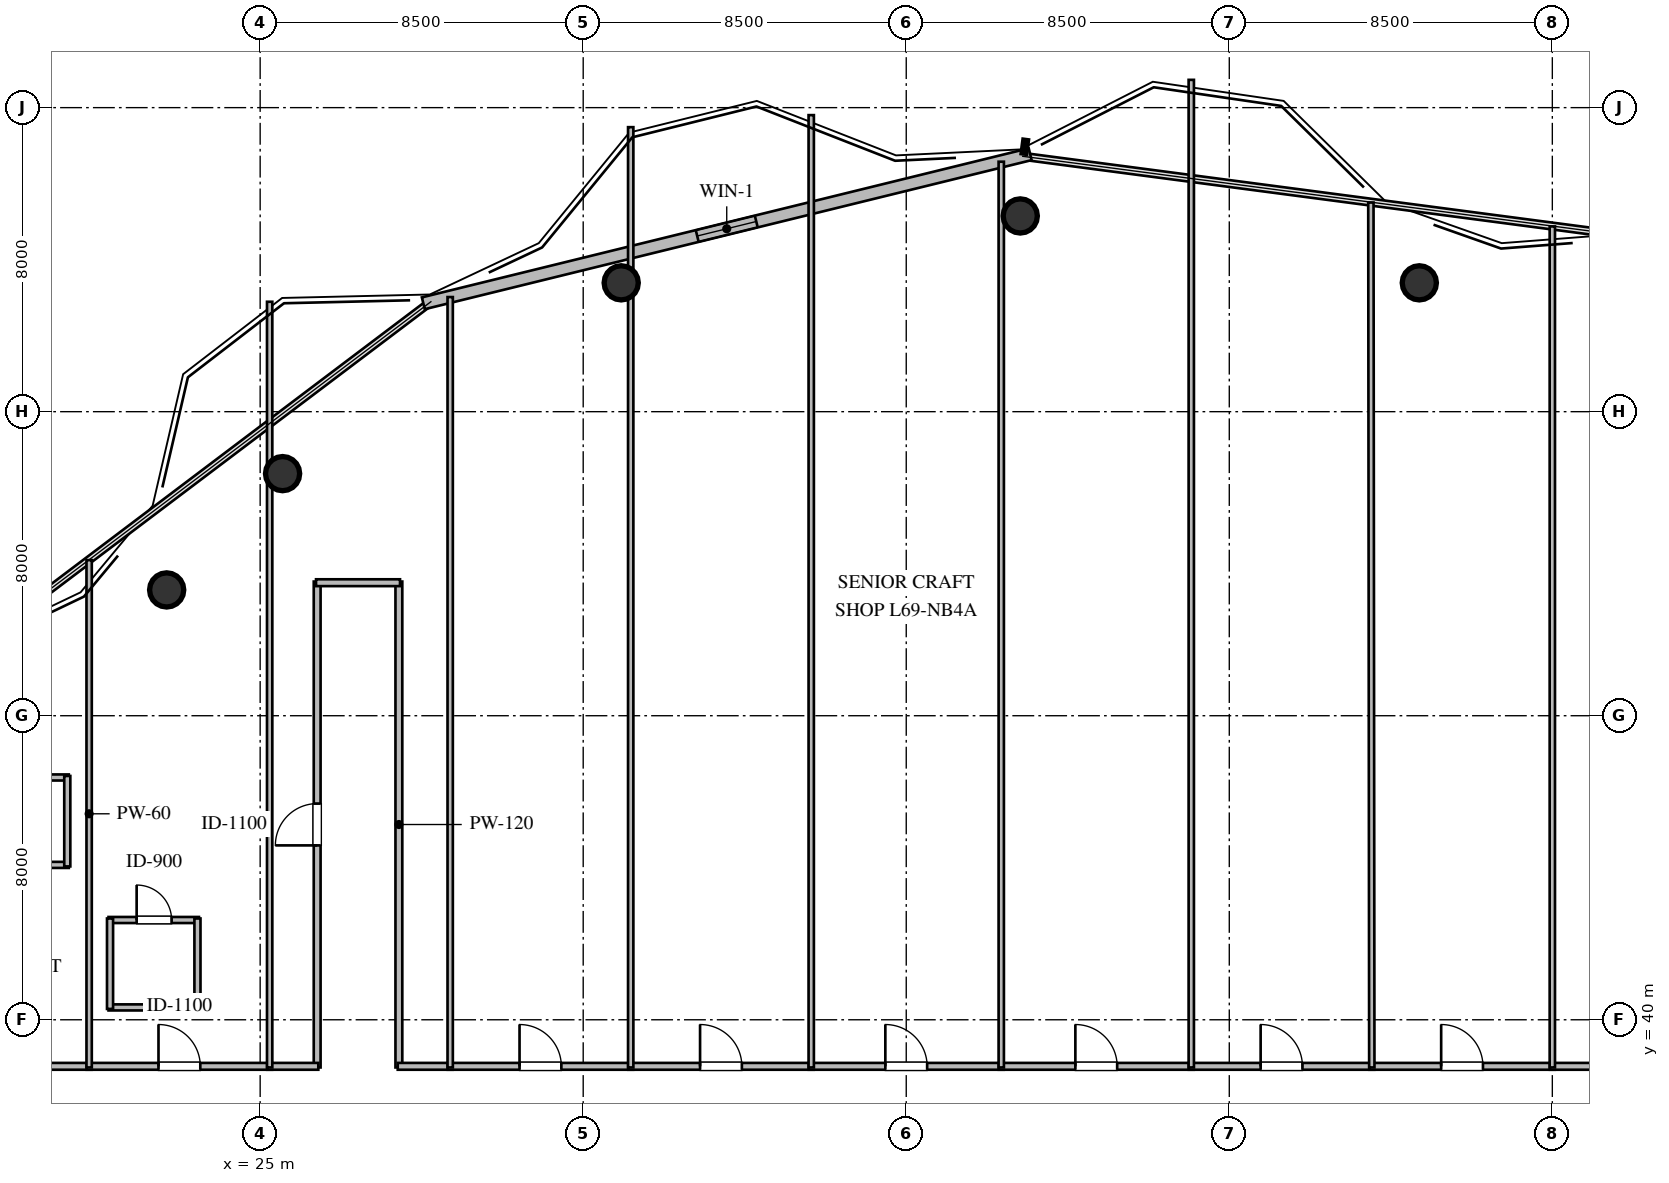
"""IFC4 building model, lengths in metres.
Left out: names, types, materials, properties, quantities, classifications, styles, units other than length and angle.
Written with IfcOpenShell. Run it as: python <this file> out.ifc"""

import sys

from ifc_helpers import new_model, si_unit, direction, frame, frame_2d, origin, origin_2d, place, context, subcontext, project, spatial, rectangle, circle, extrude, element, fill, save


model = new_model("IFC4")
c1 = context("Model", 3, precision=1e-05, world=origin(), true_north=direction((0.0, 1.0)))
c2 = subcontext(c1, "Body", "Model", "MODEL_VIEW")
j1 = project(units=[si_unit("LENGTHUNIT", "METRE"), si_unit("PLANEANGLEUNIT", "RADIAN")], contexts=[c1])
p1 = place(None, origin())
s1 = spatial("IfcSite", under=j1, at=p1, CompositionType="ELEMENT")
p2 = place(p1, origin())
s2 = spatial("IfcBuilding", under=s1, at=p2, CompositionType="ELEMENT")
p3 = place(p2, frame((0.0, 0.0, 262.4)))
s3 = spatial("IfcBuildingStorey", under=s2, at=p3, CompositionType="ELEMENT", Elevation=262.4)
for number, where, z_axis, x_axis in (
    (1, (55.5, 59.39, 0.0), (0.0, 0.0, 1.0), (1.0, 0.0, 0.0)),
    (2, (45.0, 61.15, 0.0), (0.0, 0.0, 1.0), (1.0, 0.0, 0.0)),
    (3, (34.5, 59.39, 0.0), (0.0, 0.0, 1.0), (1.0, 0.0, 0.0)),
    (4, (25.59, 54.37, 0.0), (0.0, 0.0, 1.0), (1.0, 0.0, 0.0)),
    (5, (22.54, 51.31, 0.0), (0.0, 0.0, 1.0), (1.0, 0.0, 0.0)),
):
    element("IfcColumn", number, at=place(p3, frame(where, z_axis=z_axis, x_axis=x_axis)), inside=s3, PredefinedType="COLUMN", context=c2, shape_type="SweptSolid", body=[
        extrude(circle(Radius=0.45, at=origin_2d()), origin(), (0.0, 0.0, 1.0), 3.8),
    ])
p4 = place(p3, frame((29.293, 58.852, 0.0), z_axis=(0.0, 0.0, 1.0), x_axis=(0.971137749742, 0.238519330508, 0.0)))
e6 = element("IfcWall", 6, at=p4, inside=s3, PredefinedType="STANDARD", context=c2, shape_type="SweptSolid", body=[
    extrude(rectangle(XDim=16.443, YDim=0.32, at=frame_2d((8.221, 0.0))), origin(), (0.0, 0.0, 1.0), 3.56),
])
p5 = place(p4, frame((7.421, 0.0, 1.05)))
e7 = element("IfcOpeningElement", 7, at=p5, cuts=e6, PredefinedType="OPENING", context=c2, shape_type="SweptSolid", body=[
    extrude(rectangle(XDim=1.6, YDim=1.5, at=frame_2d((0.8, 0.75))), frame((0.0, 0.17, 0.0), z_axis=(0.0, -1.0, 0.0), x_axis=(1.0, 0.0, 0.0)), (0.0, 0.0, 1.0), 0.34),
])
for number, where, z_axis, x_axis in (
    (8, (17.585, 44.075, 0.0), (0.0, 0.0, 1.0), (1.0, 0.0, 0.0)),
    (9, (17.585, 46.375, 0.0), (0.0, 0.0, 1.0), (1.0, 0.0, 0.0)),
    (10, (19.925, 44.035, 0.0), (0.0, 0.0, 1.0), (0.0, 1.0, 0.0)),
):
    element("IfcWall", number, at=place(p3, frame(where, z_axis=z_axis, x_axis=x_axis)), inside=s3, PredefinedType="PLUMBINGWALL", context=c2, shape_type="SweptSolid", body=[
        extrude(rectangle(XDim=2.38, YDim=0.16, at=frame_2d((1.19, 0.0))), origin(), (0.0, 0.0, 1.0), 3.56),
    ])
p6 = place(p3, frame((21.01, 40.325, 0.0), z_axis=(0.0, 0.0, 1.0), x_axis=(1.0, 0.0, 0.0)))
e11 = element("IfcWall", 11, at=p6, inside=s3, PredefinedType="PLUMBINGWALL", context=c2, shape_type="SweptSolid", body=[
    extrude(rectangle(XDim=2.38, YDim=0.16, at=frame_2d((1.19, 0.0))), origin(), (0.0, 0.0, 1.0), 3.56),
])
p7 = place(p3, frame((21.01, 42.625, 0.0), z_axis=(0.0, 0.0, 1.0), x_axis=(1.0, 0.0, 0.0)))
e12 = element("IfcWall", 12, at=p7, inside=s3, PredefinedType="PLUMBINGWALL", context=c2, shape_type="SweptSolid", body=[
    extrude(rectangle(XDim=2.38, YDim=0.16, at=frame_2d((1.19, 0.0))), origin(), (0.0, 0.0, 1.0), 3.56),
])
p8 = place(p7, frame((0.74, 0.0, 0.0)))
e13 = element("IfcOpeningElement", 13, at=p8, cuts=e12, PredefinedType="OPENING", context=c2, shape_type="SweptSolid", body=[
    extrude(rectangle(XDim=0.92, YDim=2.1, at=frame_2d((0.46, 1.05))), frame((0.0, 0.09, 0.0), z_axis=(0.0, -1.0, 0.0), x_axis=(1.0, 0.0, 0.0)), (0.0, 0.0, 1.0), 0.18),
])
p9 = place(p3, frame((21.05, 40.285, 0.0), z_axis=(0.0, 0.0, 1.0), x_axis=(0.0, 1.0, 0.0)))
e14 = element("IfcWall", 14, at=p9, inside=s3, PredefinedType="PLUMBINGWALL", context=c2, shape_type="SweptSolid", body=[
    extrude(rectangle(XDim=2.38, YDim=0.16, at=frame_2d((1.19, 0.0))), origin(), (0.0, 0.0, 1.0), 3.56),
])
p10 = place(p3, frame((23.35, 40.285, 0.0), z_axis=(0.0, 0.0, 1.0), x_axis=(0.0, 1.0, 0.0)))
e15 = element("IfcWall", 15, at=p10, inside=s3, PredefinedType="PLUMBINGWALL", context=c2, shape_type="SweptSolid", body=[
    extrude(rectangle(XDim=2.38, YDim=0.16, at=frame_2d((1.19, 0.0))), origin(), (0.0, 0.0, 1.0), 3.09),
])
p11 = place(p3, frame((15.651, 38.775, 0.0), z_axis=(0.0, 0.0, 1.0), x_axis=(1.0, 0.0, 0.0)))
e16 = element("IfcWall", 16, at=p11, inside=s3, PredefinedType="PARTITIONING", context=c2, shape_type="SweptSolid", body=[
    extrude(rectangle(XDim=4.914, YDim=0.18, at=frame_2d((2.457, 0.0))), origin(), (0.0, 0.0, 1.0), 3.56),
])
p12 = place(p11, frame((1.907, 0.0, 0.0)))
e17 = element("IfcOpeningElement", 17, at=p12, cuts=e16, PredefinedType="OPENING", context=c2, shape_type="SweptSolid", body=[
    extrude(rectangle(XDim=1.1, YDim=2.1, at=frame_2d((0.55, 1.05))), frame((0.0, 0.1, 0.0), z_axis=(0.0, -1.0, 0.0), x_axis=(1.0, 0.0, 0.0)), (0.0, 0.0, 1.0), 0.2),
])
p13 = place(p3, frame((20.435, 38.775, 0.0), z_axis=(0.0, 0.0, 1.0), x_axis=(1.0, 0.0, 0.0)))
e18 = element("IfcWall", 18, at=p13, inside=s3, PredefinedType="PARTITIONING", context=c2, shape_type="SweptSolid", body=[
    extrude(rectangle(XDim=4.88, YDim=0.18, at=frame_2d((2.44, 0.0))), origin(), (0.0, 0.0, 1.0), 3.56),
])
p14 = place(p13, frame((1.89, 0.0, 0.0)))
e19 = element("IfcOpeningElement", 19, at=p14, cuts=e18, PredefinedType="OPENING", context=c2, shape_type="SweptSolid", body=[
    extrude(rectangle(XDim=1.1, YDim=2.1, at=frame_2d((0.55, 1.05))), frame((0.0, 0.1, 0.0), z_axis=(0.0, -1.0, 0.0), x_axis=(1.0, 0.0, 0.0)), (0.0, 0.0, 1.0), 0.2),
])
p15 = place(p3, frame((26.5, 38.745, 0.0), z_axis=(0.0, 0.0, 1.0), x_axis=(0.0, 1.0, 0.0)))
e20 = element("IfcWall", 20, at=p15, inside=s3, PredefinedType="PARTITIONING", context=c2, shape_type="SweptSolid", body=[
    extrude(rectangle(XDim=12.785, YDim=0.18, at=frame_2d((6.393, 0.0))), origin(), (0.0, 0.0, 1.0), 3.56),
])
p16 = place(p15, frame((5.843, 0.0, 0.0)))
e21 = element("IfcOpeningElement", 21, at=p16, cuts=e20, PredefinedType="OPENING", context=c2, shape_type="SweptSolid", body=[
    extrude(rectangle(XDim=1.1, YDim=2.1, at=frame_2d((0.55, 1.05))), frame((0.0, 0.1, 0.0), z_axis=(0.0, -1.0, 0.0), x_axis=(1.0, 0.0, 0.0)), (0.0, 0.0, 1.0), 0.2),
])
p17 = place(p3, frame((28.65, 51.53, 0.0), z_axis=(0.0, 0.0, 1.0), x_axis=(0.0, -1.0, 0.0)))
e22 = element("IfcWall", 22, at=p17, inside=s3, PredefinedType="PARTITIONING", context=c2, shape_type="SweptSolid", body=[
    extrude(rectangle(XDim=12.785, YDim=0.18, at=frame_2d((6.393, 0.0))), origin(), (0.0, 0.0, 1.0), 3.56),
])
p18 = place(p3, frame((26.47, 51.5, 0.0), z_axis=(0.0, 0.0, 1.0), x_axis=(1.0, 0.0, 0.0)))
e23 = element("IfcWall", 23, at=p18, inside=s3, PredefinedType="PARTITIONING", context=c2, shape_type="SweptSolid", body=[
    extrude(rectangle(XDim=2.21, YDim=0.18, at=frame_2d((1.105, 0.0))), origin(), (0.0, 0.0, 1.0), 3.56),
])
p19 = place(p3, frame((28.62, 38.775, 0.0), z_axis=(0.0, 0.0, 1.0), x_axis=(1.0, 0.0, 0.0)))
e24 = element("IfcWall", 24, at=p19, inside=s3, PredefinedType="PARTITIONING", context=c2, shape_type="SweptSolid", body=[
    extrude(rectangle(XDim=1.445, YDim=0.18, at=frame_2d((0.722, 0.0))), origin(), (0.0, 0.0, 1.0), 3.56),
])
p20 = place(p3, frame((25.185, 38.775, 0.0), z_axis=(0.0, 0.0, 1.0), x_axis=(1.0, 0.0, 0.0)))
e25 = element("IfcWall", 25, at=p20, inside=s3, PredefinedType="PARTITIONING", context=c2, shape_type="SweptSolid", body=[
    extrude(rectangle(XDim=1.345, YDim=0.18, at=frame_2d((0.672, 0.0))), origin(), (0.0, 0.0, 1.0), 3.56),
])
p21 = place(p3, frame((29.935, 38.775, 0.0), z_axis=(0.0, 0.0, 1.0), x_axis=(1.0, 0.0, 0.0)))
e26 = element("IfcWall", 26, at=p21, inside=s3, PredefinedType="PARTITIONING", context=c2, shape_type="SweptSolid", body=[
    extrude(rectangle(XDim=4.88, YDim=0.18, at=frame_2d((2.44, 0.0))), origin(), (0.0, 0.0, 1.0), 3.56),
])
p22 = place(p21, frame((1.89, 0.0, 0.0)))
e27 = element("IfcOpeningElement", 27, at=p22, cuts=e26, PredefinedType="OPENING", context=c2, shape_type="SweptSolid", body=[
    extrude(rectangle(XDim=1.1, YDim=2.1, at=frame_2d((0.55, 1.05))), frame((0.0, 0.1, 0.0), z_axis=(0.0, -1.0, 0.0), x_axis=(1.0, 0.0, 0.0)), (0.0, 0.0, 1.0), 0.2),
])
p23 = place(p3, frame((34.685, 38.775, 0.0), z_axis=(0.0, 0.0, 1.0), x_axis=(1.0, 0.0, 0.0)))
e28 = element("IfcWall", 28, at=p23, inside=s3, PredefinedType="PARTITIONING", context=c2, shape_type="SweptSolid", body=[
    extrude(rectangle(XDim=4.88, YDim=0.18, at=frame_2d((2.44, 0.0))), origin(), (0.0, 0.0, 1.0), 3.56),
])
p24 = place(p23, frame((1.89, 0.0, 0.0)))
e29 = element("IfcOpeningElement", 29, at=p24, cuts=e28, PredefinedType="OPENING", context=c2, shape_type="SweptSolid", body=[
    extrude(rectangle(XDim=1.1, YDim=2.1, at=frame_2d((0.55, 1.05))), frame((0.0, 0.1, 0.0), z_axis=(0.0, -1.0, 0.0), x_axis=(1.0, 0.0, 0.0)), (0.0, 0.0, 1.0), 0.2),
])
p25 = place(p3, frame((39.435, 38.775, 0.0), z_axis=(0.0, 0.0, 1.0), x_axis=(1.0, 0.0, 0.0)))
e30 = element("IfcWall", 30, at=p25, inside=s3, PredefinedType="PARTITIONING", context=c2, shape_type="SweptSolid", body=[
    extrude(rectangle(XDim=5.13, YDim=0.18, at=frame_2d((2.565, 0.0))), origin(), (0.0, 0.0, 1.0), 3.56),
])
p26 = place(p25, frame((2.015, 0.0, 0.0)))
e31 = element("IfcOpeningElement", 31, at=p26, cuts=e30, PredefinedType="OPENING", context=c2, shape_type="SweptSolid", body=[
    extrude(rectangle(XDim=1.1, YDim=2.1, at=frame_2d((0.55, 1.05))), frame((0.0, 0.1, 0.0), z_axis=(0.0, -1.0, 0.0), x_axis=(1.0, 0.0, 0.0)), (0.0, 0.0, 1.0), 0.2),
])
p27 = place(p3, frame((44.435, 38.775, 0.0), z_axis=(0.0, 0.0, 1.0), x_axis=(1.0, 0.0, 0.0)))
e32 = element("IfcWall", 32, at=p27, inside=s3, PredefinedType="PARTITIONING", context=c2, shape_type="SweptSolid", body=[
    extrude(rectangle(XDim=5.13, YDim=0.18, at=frame_2d((2.565, 0.0))), origin(), (0.0, 0.0, 1.0), 3.56),
])
p28 = place(p27, frame((2.015, 0.0, 0.0)))
e33 = element("IfcOpeningElement", 33, at=p28, cuts=e32, PredefinedType="OPENING", context=c2, shape_type="SweptSolid", body=[
    extrude(rectangle(XDim=1.1, YDim=2.1, at=frame_2d((0.55, 1.05))), frame((0.0, 0.1, 0.0), z_axis=(0.0, -1.0, 0.0), x_axis=(1.0, 0.0, 0.0)), (0.0, 0.0, 1.0), 0.2),
])
p29 = place(p3, frame((49.435, 38.775, 0.0), z_axis=(0.0, 0.0, 1.0), x_axis=(1.0, 0.0, 0.0)))
e34 = element("IfcWall", 34, at=p29, inside=s3, PredefinedType="PARTITIONING", context=c2, shape_type="SweptSolid", body=[
    extrude(rectangle(XDim=4.88, YDim=0.18, at=frame_2d((2.44, 0.0))), origin(), (0.0, 0.0, 1.0), 3.56),
])
p30 = place(p29, frame((1.89, 0.0, 0.0)))
e35 = element("IfcOpeningElement", 35, at=p30, cuts=e34, PredefinedType="OPENING", context=c2, shape_type="SweptSolid", body=[
    extrude(rectangle(XDim=1.1, YDim=2.1, at=frame_2d((0.55, 1.05))), frame((0.0, 0.1, 0.0), z_axis=(0.0, -1.0, 0.0), x_axis=(1.0, 0.0, 0.0)), (0.0, 0.0, 1.0), 0.2),
])
p31 = place(p3, frame((54.185, 38.775, 0.0), z_axis=(0.0, 0.0, 1.0), x_axis=(1.0, 0.0, 0.0)))
e36 = element("IfcWall", 36, at=p31, inside=s3, PredefinedType="PARTITIONING", context=c2, shape_type="SweptSolid", body=[
    extrude(rectangle(XDim=4.88, YDim=0.18, at=frame_2d((2.44, 0.0))), origin(), (0.0, 0.0, 1.0), 3.56),
])
p32 = place(p31, frame((1.89, 0.0, 0.0)))
e37 = element("IfcOpeningElement", 37, at=p32, cuts=e36, PredefinedType="OPENING", context=c2, shape_type="SweptSolid", body=[
    extrude(rectangle(XDim=1.1, YDim=2.1, at=frame_2d((0.55, 1.05))), frame((0.0, 0.1, 0.0), z_axis=(0.0, -1.0, 0.0), x_axis=(1.0, 0.0, 0.0)), (0.0, 0.0, 1.0), 0.2),
])
p33 = place(p3, frame((58.935, 38.775, 0.0), z_axis=(0.0, 0.0, 1.0), x_axis=(1.0, 0.0, 0.0)))
e38 = element("IfcWall", 38, at=p33, inside=s3, PredefinedType="PARTITIONING", context=c2, shape_type="SweptSolid", body=[
    extrude(rectangle(XDim=5.595, YDim=0.18, at=frame_2d((2.797, 0.0))), origin(), (0.0, 0.0, 1.0), 3.56),
])
p34 = place(p33, frame((2.247, 0.0, 0.0)))
e39 = element("IfcOpeningElement", 39, at=p34, cuts=e38, PredefinedType="OPENING", context=c2, shape_type="SweptSolid", body=[
    extrude(rectangle(XDim=1.1, YDim=2.1, at=frame_2d((0.55, 1.05))), frame((0.0, 0.1, 0.0), z_axis=(0.0, -1.0, 0.0), x_axis=(1.0, 0.0, 0.0)), (0.0, 0.0, 1.0), 0.2),
])
p35 = place(p3, frame((20.5, 52.094, 0.0), z_axis=(0.0, 0.0, 1.0), x_axis=(0.0, -1.0, 0.0)))
e40 = element("IfcWall", 40, at=p35, inside=s3, PredefinedType="PARTITIONING", context=c2, shape_type="SweptSolid", body=[
    extrude(rectangle(XDim=13.349, YDim=0.14, at=frame_2d((6.675, 0.0))), origin(), (0.0, 0.0, 1.0), 3.56),
])
p36 = place(p3, frame((25.25, 58.892, 0.0), z_axis=(0.0, 0.0, 1.0), x_axis=(0.0, -1.0, 0.0)))
e41 = element("IfcWall", 41, at=p36, inside=s3, PredefinedType="PARTITIONING", context=c2, shape_type="SweptSolid", body=[
    extrude(rectangle(XDim=20.147, YDim=0.14, at=frame_2d((10.073, 0.0))), origin(), (0.0, 0.0, 1.0), 3.09),
])
p37 = place(p3, frame((30.0, 59.016, 0.0), z_axis=(0.0, 0.0, 1.0), x_axis=(0.0, -1.0, 0.0)))
e42 = element("IfcWall", 42, at=p37, inside=s3, PredefinedType="PARTITIONING", context=c2, shape_type="SweptSolid", body=[
    extrude(rectangle(XDim=20.271, YDim=0.14, at=frame_2d((10.135, 0.0))), origin(), (0.0, 0.0, 1.0), 3.56),
])
p38 = place(p3, frame((34.75, 63.486, 0.0), z_axis=(0.0, 0.0, 1.0), x_axis=(0.0, -1.0, 0.0)))
e43 = element("IfcWall", 43, at=p38, inside=s3, PredefinedType="PARTITIONING", context=c2, shape_type="SweptSolid", body=[
    extrude(rectangle(XDim=24.741, YDim=0.14, at=frame_2d((12.371, 0.0))), origin(), (0.0, 0.0, 1.0), 3.09),
])
p39 = place(p3, frame((39.5, 63.803, 0.0), z_axis=(0.0, 0.0, 1.0), x_axis=(0.0, -1.0, 0.0)))
e44 = element("IfcWall", 44, at=p39, inside=s3, PredefinedType="PARTITIONING", context=c2, shape_type="SweptSolid", body=[
    extrude(rectangle(XDim=25.058, YDim=0.14, at=frame_2d((12.529, 0.0))), origin(), (0.0, 0.0, 1.0), 3.56),
])
p40 = place(p3, frame((44.5, 62.577, 0.0), z_axis=(0.0, 0.0, 1.0), x_axis=(0.0, -1.0, 0.0)))
e45 = element("IfcWall", 45, at=p40, inside=s3, PredefinedType="PARTITIONING", context=c2, shape_type="SweptSolid", body=[
    extrude(rectangle(XDim=23.832, YDim=0.14, at=frame_2d((11.916, 0.0))), origin(), (0.0, 0.0, 1.0), 3.09),
])
p41 = place(p3, frame((49.5, 64.731, 0.0), z_axis=(0.0, 0.0, 1.0), x_axis=(0.0, -1.0, 0.0)))
e46 = element("IfcWall", 46, at=p41, inside=s3, PredefinedType="PARTITIONING", context=c2, shape_type="SweptSolid", body=[
    extrude(rectangle(XDim=25.986, YDim=0.14, at=frame_2d((12.993, 0.0))), origin(), (0.0, 0.0, 1.0), 3.56),
])
p42 = place(p3, frame((54.226, 61.503, 0.0), z_axis=(0.0, 0.0, 1.0), x_axis=(0.001072776588, -0.999999424575, 0.0)))
e47 = element("IfcWall", 47, at=p42, inside=s3, PredefinedType="PARTITIONING", context=c2, shape_type="SweptSolid", body=[
    extrude(rectangle(XDim=22.758, YDim=0.14, at=frame_2d((11.379, 0.0))), origin(), (0.0, 0.0, 1.0), 3.56),
])
p43 = place(p3, frame((59.0, 60.874, 0.0), z_axis=(0.0, 0.0, 1.0), x_axis=(0.0, -1.0, 0.0)))
e48 = element("IfcWall", 48, at=p43, inside=s3, PredefinedType="PARTITIONING", context=c2, shape_type="SweptSolid", body=[
    extrude(rectangle(XDim=22.129, YDim=0.14, at=frame_2d((11.064, 0.0))), origin(), (0.0, 0.0, 1.0), 3.56),
])
p44 = place(p5, origin())
e49 = element("IfcWindow", 49, at=p44, inside=s3, PartitioningType="SINGLE_PANEL", PredefinedType="WINDOW", context=c2, shape_type="SweptSolid", body=[
    extrude(rectangle(XDim=1.6, YDim=1.5, at=frame_2d((0.8, 0.75))), frame((0.0, 0.03, 0.0), z_axis=(0.0, -1.0, 0.0), x_axis=(1.0, 0.0, 0.0)), (0.0, 0.0, 1.0), 0.06),
])
fill(e7, e49)
p45 = place(p8, origin())
e50 = element("IfcDoor", 50, at=p45, inside=s3, OperationType="SINGLE_SWING_LEFT", PredefinedType="DOOR", context=c2, shape_type="SweptSolid", body=[
    extrude(rectangle(XDim=0.92, YDim=2.1, at=frame_2d((0.46, 1.05))), frame((0.0, 0.025, 0.0), z_axis=(0.0, -1.0, 0.0), x_axis=(1.0, 0.0, 0.0)), (0.0, 0.0, 1.0), 0.05),
])
fill(e13, e50)
p46 = place(p14, origin())
e51 = element("IfcDoor", 51, at=p46, inside=s3, OperationType="SINGLE_SWING_LEFT", PredefinedType="DOOR", context=c2, shape_type="SweptSolid", body=[
    extrude(rectangle(XDim=1.1, YDim=2.1, at=frame_2d((0.55, 1.05))), frame((0.0, 0.025, 0.0), z_axis=(0.0, -1.0, 0.0), x_axis=(1.0, 0.0, 0.0)), (0.0, 0.0, 1.0), 0.05),
])
fill(e19, e51)
p47 = place(p16, origin())
e52 = element("IfcDoor", 52, at=p47, inside=s3, OperationType="SINGLE_SWING_LEFT", PredefinedType="DOOR", context=c2, shape_type="SweptSolid", body=[
    extrude(rectangle(XDim=1.1, YDim=2.1, at=frame_2d((0.55, 1.05))), frame((0.0, 0.025, 0.0), z_axis=(0.0, -1.0, 0.0), x_axis=(1.0, 0.0, 0.0)), (0.0, 0.0, 1.0), 0.05),
])
fill(e21, e52)
p48 = place(p22, origin())
e53 = element("IfcDoor", 53, at=p48, inside=s3, OperationType="SINGLE_SWING_LEFT", PredefinedType="DOOR", context=c2, shape_type="SweptSolid", body=[
    extrude(rectangle(XDim=1.1, YDim=2.1, at=frame_2d((0.55, 1.05))), frame((0.0, 0.025, 0.0), z_axis=(0.0, -1.0, 0.0), x_axis=(1.0, 0.0, 0.0)), (0.0, 0.0, 1.0), 0.05),
])
fill(e27, e53)
p49 = place(p24, origin())
e54 = element("IfcDoor", 54, at=p49, inside=s3, OperationType="SINGLE_SWING_LEFT", PredefinedType="DOOR", context=c2, shape_type="SweptSolid", body=[
    extrude(rectangle(XDim=1.1, YDim=2.1, at=frame_2d((0.55, 1.05))), frame((0.0, 0.025, 0.0), z_axis=(0.0, -1.0, 0.0), x_axis=(1.0, 0.0, 0.0)), (0.0, 0.0, 1.0), 0.05),
])
fill(e29, e54)
p50 = place(p26, origin())
e55 = element("IfcDoor", 55, at=p50, inside=s3, OperationType="SINGLE_SWING_LEFT", PredefinedType="DOOR", context=c2, shape_type="SweptSolid", body=[
    extrude(rectangle(XDim=1.1, YDim=2.1, at=frame_2d((0.55, 1.05))), frame((0.0, 0.025, 0.0), z_axis=(0.0, -1.0, 0.0), x_axis=(1.0, 0.0, 0.0)), (0.0, 0.0, 1.0), 0.05),
])
fill(e31, e55)
p51 = place(p28, origin())
e56 = element("IfcDoor", 56, at=p51, inside=s3, OperationType="SINGLE_SWING_LEFT", PredefinedType="DOOR", context=c2, shape_type="SweptSolid", body=[
    extrude(rectangle(XDim=1.1, YDim=2.1, at=frame_2d((0.55, 1.05))), frame((0.0, 0.025, 0.0), z_axis=(0.0, -1.0, 0.0), x_axis=(1.0, 0.0, 0.0)), (0.0, 0.0, 1.0), 0.05),
])
fill(e33, e56)
p52 = place(p30, origin())
e57 = element("IfcDoor", 57, at=p52, inside=s3, OperationType="SINGLE_SWING_LEFT", PredefinedType="DOOR", context=c2, shape_type="SweptSolid", body=[
    extrude(rectangle(XDim=1.1, YDim=2.1, at=frame_2d((0.55, 1.05))), frame((0.0, 0.025, 0.0), z_axis=(0.0, -1.0, 0.0), x_axis=(1.0, 0.0, 0.0)), (0.0, 0.0, 1.0), 0.05),
])
fill(e35, e57)
p53 = place(p32, origin())
e58 = element("IfcDoor", 58, at=p53, inside=s3, OperationType="SINGLE_SWING_LEFT", PredefinedType="DOOR", context=c2, shape_type="SweptSolid", body=[
    extrude(rectangle(XDim=1.1, YDim=2.1, at=frame_2d((0.55, 1.05))), frame((0.0, 0.025, 0.0), z_axis=(0.0, -1.0, 0.0), x_axis=(1.0, 0.0, 0.0)), (0.0, 0.0, 1.0), 0.05),
])
fill(e37, e58)
save(model, sys.argv[1])
